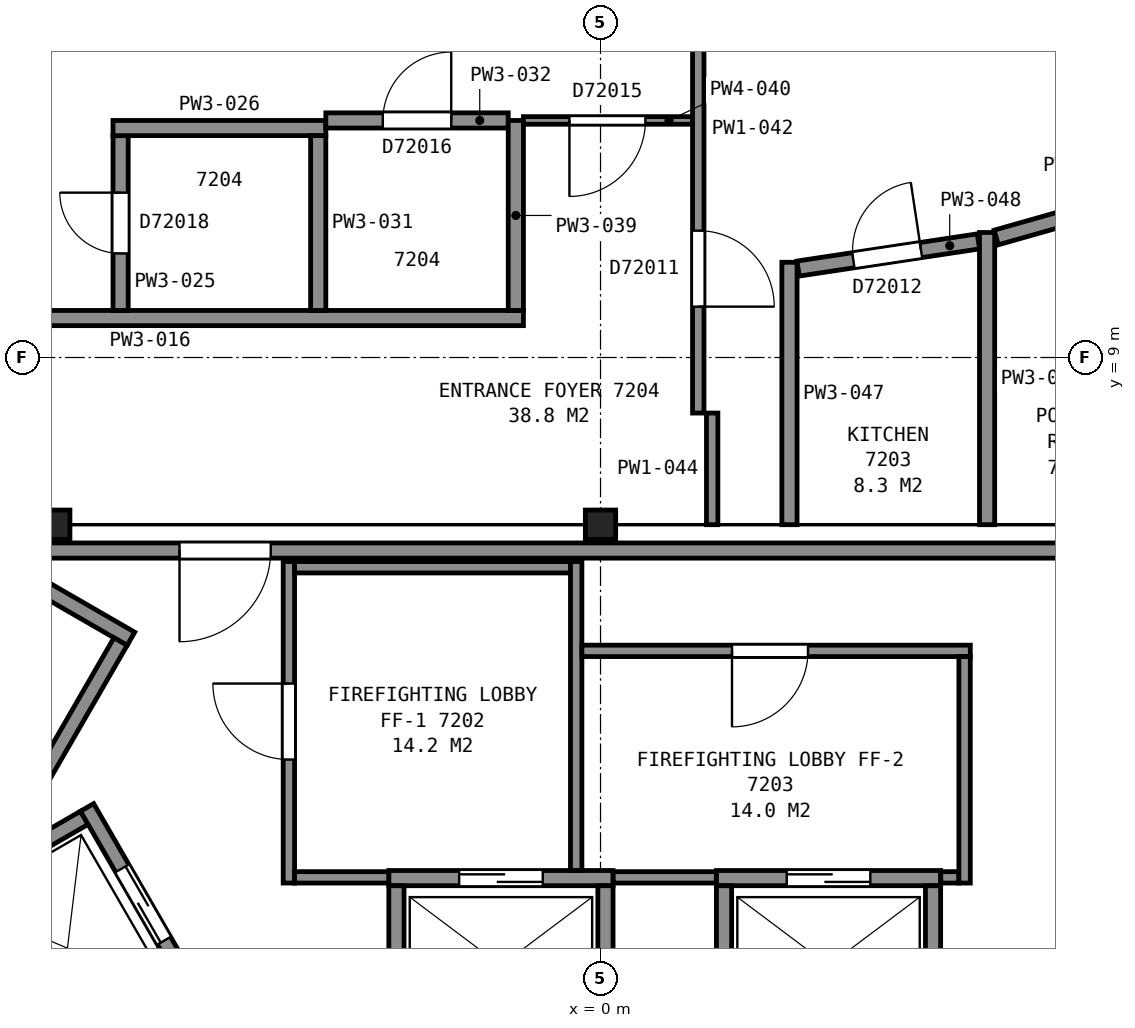
"""IFC4 building model, lengths in metres.
Left out: names, types, materials, properties, quantities, classifications, styles, units other than length and angle.
Written with IfcOpenShell. Run it as: python <this file> out.ifc"""

import sys

from ifc_helpers import new_model, si_unit, direction, frame, frame_2d, origin, origin_2d, place, context, subcontext, project, spatial, rectangle, i_section, extrude, element, fill, save


model = new_model("IFC4")
c1 = context("Model", 3, precision=1e-05, world=origin(), true_north=direction((0.0, 1.0)))
c2 = subcontext(c1, "Body", "Model", "MODEL_VIEW")
j1 = project(units=[si_unit("LENGTHUNIT", "METRE"), si_unit("PLANEANGLEUNIT", "RADIAN")], contexts=[c1])
p1 = place(None, origin())
s1 = spatial("IfcSite", under=j1, at=p1, CompositionType="ELEMENT")
p2 = place(p1, origin())
s2 = spatial("IfcBuilding", under=s1, at=p2, CompositionType="ELEMENT")
p3 = place(p2, frame((0.0, 0.0, 286.2)))
s3 = spatial("IfcBuildingStorey", under=s2, at=p3, CompositionType="ELEMENT", Elevation=286.2)
for number, where, z_axis, x_axis in (
    (1, (0.0, 6.8, 0.0), (0.0, 0.0, 1.0), (1.0, 0.0, 0.0)),
    (2, (-7.18, 6.8, 0.0), (0.0, 0.0, 1.0), (1.0, 0.0, 0.0)),
):
    element("IfcColumn", number, at=place(p3, frame(where, z_axis=z_axis, x_axis=x_axis)), inside=s3, PredefinedType="COLUMN", context=c2, shape_type="SweptSolid", body=[
        extrude(i_section(OverallWidth=0.399, OverallDepth=0.386, WebThickness=0.021, FlangeThickness=0.033, FilletRadius=0.015, at=origin_2d()), origin(), (0.0, 0.0, 1.0), 3.7),
    ])
p4 = place(p3, frame((-6.178, 5.299, 0.0), z_axis=(0.0, 0.0, 1.0), x_axis=(-0.866033125095, 0.499986626058, 0.0)))
e3 = element("IfcWall", 3, at=p4, inside=s3, PredefinedType="PARTITIONING", context=c2, shape_type="SweptSolid", body=[
    extrude(rectangle(XDim=7.2, YDim=0.2, at=frame_2d((3.6, 0.0))), origin(), (0.0, 0.0, 1.0), 3.45),
])
p5 = place(p3, frame((-6.315, 5.262, 0.0), z_axis=(0.0, 0.0, 1.0), x_axis=(-0.500049511043, -0.865996816683, 0.0)))
e4 = element("IfcWall", 4, at=p5, inside=s3, PredefinedType="PARTITIONING", context=c2, shape_type="SweptSolid", body=[
    extrude(rectangle(XDim=2.8, YDim=0.2, at=frame_2d((1.4, 0.0))), origin(), (0.0, 0.0, 1.0), 3.45),
])
p6 = place(p3, frame((-2.785, 2.15, 0.0), z_axis=(0.0, 0.0, 1.0), x_axis=(1.0, 0.0, 0.0)))
e5 = element("IfcWall", 5, at=p6, inside=s3, PredefinedType="PARTITIONING", context=c2, shape_type="SweptSolid", body=[
    extrude(rectangle(XDim=2.95, YDim=0.2, at=frame_2d((1.475, 0.0))), origin(), (0.0, 0.0, 1.0), 3.7),
])
p7 = place(p6, frame((0.925, 0.0, 0.0)))
e6 = element("IfcOpeningElement", 6, at=p7, cuts=e5, PredefinedType="OPENING", context=c2, shape_type="SweptSolid", body=[
    extrude(rectangle(XDim=1.1, YDim=2.1, at=frame_2d((0.55, 1.05))), frame((0.0, 0.11, 0.0), z_axis=(0.0, -1.0, 0.0), x_axis=(1.0, 0.0, 0.0)), (0.0, 0.0, 1.0), 0.22),
])
p8 = place(p3, frame((1.525, 2.15, 0.0), z_axis=(0.0, 0.0, 1.0), x_axis=(1.0, 0.0, 0.0)))
e7 = element("IfcWall", 7, at=p8, inside=s3, PredefinedType="PARTITIONING", context=c2, shape_type="SweptSolid", body=[
    extrude(rectangle(XDim=2.95, YDim=0.2, at=frame_2d((1.475, 0.0))), origin(), (0.0, 0.0, 1.0), 3.7),
])
p9 = place(p8, frame((0.925, 0.0, 0.0)))
e8 = element("IfcOpeningElement", 8, at=p9, cuts=e7, PredefinedType="OPENING", context=c2, shape_type="SweptSolid", body=[
    extrude(rectangle(XDim=1.1, YDim=2.1, at=frame_2d((0.55, 1.05))), frame((0.0, 0.11, 0.0), z_axis=(0.0, -1.0, 0.0), x_axis=(1.0, 0.0, 0.0)), (0.0, 0.0, 1.0), 0.22),
])
for number, where, z_axis, x_axis in (
    (9, (-8.48, 1.969, 0.0), (0.0, 0.0, 1.0), (0.866, 0.5, 0.0)),
    (10, (4.375, 0.1, 0.0), (0.0, 0.0, 1.0), (0.0, 1.0, 0.0)),
    (11, (1.625, 0.1, 0.0), (0.0, 0.0, 1.0), (0.0, 1.0, 0.0)),
    (12, (0.065, 0.1, 0.0), (0.0, 0.0, 1.0), (0.0, 1.0, 0.0)),
    (13, (-2.685, 0.1, 0.0), (0.0, 0.0, 1.0), (0.0, 1.0, 0.0)),
):
    element("IfcWall", number, at=place(p3, frame(where, z_axis=z_axis, x_axis=x_axis)), inside=s3, PredefinedType="PARTITIONING", context=c2, shape_type="SweptSolid", body=[
        extrude(rectangle(XDim=1.95, YDim=0.2, at=frame_2d((0.975, 0.0))), origin(), (0.0, 0.0, 1.0), 3.7),
    ])
p10 = place(p3, frame((-5.28, 0.525, 0.0), z_axis=(0.0, 0.0, 1.0), x_axis=(-0.500037662692, 0.866003658127, 0.0)))
e14 = element("IfcWall", 14, at=p10, inside=s3, PredefinedType="PARTITIONING", context=c2, shape_type="SweptSolid", body=[
    extrude(rectangle(XDim=2.95, YDim=0.2, at=frame_2d((1.475, 0.0))), origin(), (0.0, 0.0, 1.0), 3.7),
])
p11 = place(p10, frame((0.925, 0.0, 0.0)))
e15 = element("IfcOpeningElement", 15, at=p11, cuts=e14, PredefinedType="OPENING", context=c2, shape_type="SweptSolid", body=[
    extrude(rectangle(XDim=1.1, YDim=2.1, at=frame_2d((0.55, 1.05))), frame((0.0, 0.11, 0.0), z_axis=(0.0, -1.0, 0.0), x_axis=(1.0, 0.0, 0.0)), (0.0, 0.0, 1.0), 0.22),
])
p12 = place(p3, frame((-7.142, -0.55, 0.0), z_axis=(0.0, 0.0, 1.0), x_axis=(-0.49997559174, 0.866039495442, 0.0)))
e16 = element("IfcWall", 16, at=p12, inside=s3, PredefinedType="PARTITIONING", context=c2, shape_type="SweptSolid", body=[
    extrude(rectangle(XDim=2.95, YDim=0.2, at=frame_2d((1.475, 0.0))), origin(), (0.0, 0.0, 1.0), 3.7),
])
p13 = place(p3, frame((7.829, 6.46, 0.0), z_axis=(0.0, 0.0, 1.0), x_axis=(-1.0, 0.0, 0.0)))
e17 = element("IfcWall", 17, at=p13, inside=s3, PredefinedType="PARTITIONING", context=c2, shape_type="SweptSolid", body=[
    extrude(rectangle(XDim=15.658, YDim=0.2, at=frame_2d((7.829, 0.0))), origin(), (0.0, 0.0, 1.0), 3.45),
])
p14 = place(p13, frame((12.168, 0.0, 0.0)))
e18 = element("IfcOpeningElement", 18, at=p14, cuts=e17, PredefinedType="OPENING", context=c2, shape_type="SweptSolid", body=[
    extrude(rectangle(XDim=1.2, YDim=2.1, at=frame_2d((0.6, 1.05))), frame((0.0, 0.11, 0.0), z_axis=(0.0, -1.0, 0.0), x_axis=(1.0, 0.0, 0.0)), (0.0, 0.0, 1.0), 0.22),
])
p15 = place(p3, frame((-4.1, 2.085, 0.0), z_axis=(0.0, 0.0, 1.0), x_axis=(0.0, 1.0, 0.0)))
e19 = element("IfcWall", 19, at=p15, inside=s3, PredefinedType="PARTITIONING", context=c2, shape_type="SweptSolid", body=[
    extrude(rectangle(XDim=4.23, YDim=0.15, at=frame_2d((2.115, 0.0))), origin(), (0.0, 0.0, 1.0), 3.45),
])
p16 = place(p15, frame((1.625, 0.0, 0.0)))
e20 = element("IfcOpeningElement", 20, at=p16, cuts=e19, PredefinedType="OPENING", context=c2, shape_type="SweptSolid", body=[
    extrude(rectangle(XDim=1.0, YDim=2.1, at=frame_2d((0.5, 1.05))), frame((0.0, 0.085, 0.0), z_axis=(0.0, -1.0, 0.0), x_axis=(1.0, 0.0, 0.0)), (0.0, 0.0, 1.0), 0.17),
])
p17 = place(p3, frame((-4.025, 2.16, 0.0), z_axis=(0.0, 0.0, 1.0), x_axis=(1.0, 0.0, 0.0)))
e21 = element("IfcWall", 21, at=p17, inside=s3, PredefinedType="PARTITIONING", context=c2, shape_type="SweptSolid", body=[
    extrude(rectangle(XDim=1.238, YDim=0.15, at=frame_2d((0.619, 0.0))), origin(), (0.0, 0.0, 1.0), 3.45),
])
p18 = place(p3, frame((-4.025, 6.24, 0.0), z_axis=(0.0, 0.0, 1.0), x_axis=(1.0, 0.0, 0.0)))
e22 = element("IfcWall", 22, at=p18, inside=s3, PredefinedType="PARTITIONING", context=c2, shape_type="SweptSolid", body=[
    extrude(rectangle(XDim=3.63, YDim=0.15, at=frame_2d((1.815, 0.0))), origin(), (0.0, 0.0, 1.0), 3.45),
])
p19 = place(p3, frame((-0.32, 2.252, 0.0), z_axis=(0.0, 0.0, 1.0), x_axis=(0.0, 1.0, 0.0)))
e23 = element("IfcWall", 23, at=p19, inside=s3, PredefinedType="PARTITIONING", context=c2, shape_type="SweptSolid", body=[
    extrude(rectangle(XDim=4.063, YDim=0.15, at=frame_2d((2.031, 0.0))), origin(), (0.0, 0.0, 1.0), 3.45),
])
p20 = place(p3, frame((-0.245, 5.14, 0.0), z_axis=(0.0, 0.0, 1.0), x_axis=(1.0, 0.0, 0.0)))
e24 = element("IfcWall", 24, at=p20, inside=s3, PredefinedType="PARTITIONING", context=c2, shape_type="SweptSolid", body=[
    extrude(rectangle(XDim=5.11, YDim=0.15, at=frame_2d((2.555, 0.0))), origin(), (0.0, 0.0, 1.0), 3.45),
])
p21 = place(p20, frame((1.975, 0.0, 0.0)))
e25 = element("IfcOpeningElement", 25, at=p21, cuts=e24, PredefinedType="OPENING", context=c2, shape_type="SweptSolid", body=[
    extrude(rectangle(XDim=1.0, YDim=2.1, at=frame_2d((0.5, 1.05))), frame((0.0, 0.085, 0.0), z_axis=(0.0, -1.0, 0.0), x_axis=(1.0, 0.0, 0.0)), (0.0, 0.0, 1.0), 0.17),
])
p22 = place(p3, frame((0.167, 2.16, 0.0), z_axis=(0.0, 0.0, 1.0), x_axis=(1.0, 0.0, 0.0)))
e26 = element("IfcWall", 26, at=p22, inside=s3, PredefinedType="PARTITIONING", context=c2, shape_type="SweptSolid", body=[
    extrude(rectangle(XDim=1.356, YDim=0.15, at=frame_2d((0.678, 0.0))), origin(), (0.0, 0.0, 1.0), 3.45),
])
p23 = place(p3, frame((3.828, -6.29, 0.0), z_axis=(0.0, 0.0, 1.0), x_axis=(0.499979739078, 0.866037101117, 0.0)))
e27 = element("IfcWall", 27, at=p23, inside=s3, PredefinedType="PARTITIONING", context=c2, shape_type="SweptSolid", body=[
    extrude(rectangle(XDim=11.363, YDim=0.2, at=frame_2d((5.681, 0.0))), origin(), (0.0, 0.0, 1.0), 3.45),
])
p24 = place(p23, frame((0.55, 0.0, 0.0)))
e28 = element("IfcOpeningElement", 28, at=p24, cuts=e27, PredefinedType="OPENING", context=c2, shape_type="SweptSolid", body=[
    extrude(rectangle(XDim=1.2, YDim=2.1, at=frame_2d((0.6, 1.05))), frame((0.0, 0.11, 0.0), z_axis=(0.0, -1.0, 0.0), x_axis=(1.0, 0.0, 0.0)), (0.0, 0.0, 1.0), 0.22),
])
p25 = place(p3, frame((4.477, 2.16, 0.0), z_axis=(0.0, 0.0, 1.0), x_axis=(1.0, 0.0, 0.0)))
e29 = element("IfcWall", 29, at=p25, inside=s3, PredefinedType="PARTITIONING", context=c2, shape_type="SweptSolid", body=[
    extrude(rectangle(XDim=0.238, YDim=0.15, at=frame_2d((0.119, 0.0))), origin(), (0.0, 0.0, 1.0), 3.45),
])
p26 = place(p3, frame((4.79, 2.085, 0.0), z_axis=(0.0, 0.0, 1.0), x_axis=(0.0, 1.0, 0.0)))
e30 = element("IfcWall", 30, at=p26, inside=s3, PredefinedType="PARTITIONING", context=c2, shape_type="SweptSolid", body=[
    extrude(rectangle(XDim=2.98, YDim=0.15, at=frame_2d((1.49, 0.0))), origin(), (0.0, 0.0, 1.0), 3.45),
])
p27 = place(p3, frame((-10.838, 9.519, 0.0), z_axis=(0.0, 0.0, 1.0), x_axis=(1.0, 0.0, 0.0)))
e31 = element("IfcWall", 31, at=p27, inside=s3, PredefinedType="PARTITIONING", context=c2, shape_type="SweptSolid", body=[
    extrude(rectangle(XDim=9.824, YDim=0.2, at=frame_2d((4.912, 0.0))), origin(), (0.0, 0.0, 1.0), 2.723),
])
p28 = place(p3, frame((-6.314, 11.919, 0.0), z_axis=(0.0, 0.0, 1.0), x_axis=(0.0, -1.0, 0.0)))
e32 = element("IfcWall", 32, at=p28, inside=s3, PredefinedType="PARTITIONING", context=c2, shape_type="SweptSolid", body=[
    extrude(rectangle(XDim=2.3, YDim=0.2, at=frame_2d((1.15, 0.0))), origin(), (0.0, 0.0, 1.0), 2.723),
])
p29 = place(p28, frame((0.75, 0.0, 0.0)))
e33 = element("IfcOpeningElement", 33, at=p29, cuts=e32, PredefinedType="OPENING", context=c2, shape_type="SweptSolid", body=[
    extrude(rectangle(XDim=0.8, YDim=2.1, at=frame_2d((0.4, 1.05))), frame((0.0, 0.11, 0.0), z_axis=(0.0, -1.0, 0.0), x_axis=(1.0, 0.0, 0.0)), (0.0, 0.0, 1.0), 0.22),
])
p30 = place(p3, frame((-6.414, 12.019, 0.0), z_axis=(0.0, 0.0, 1.0), x_axis=(1.0, 0.0, 0.0)))
e34 = element("IfcWall", 34, at=p30, inside=s3, PredefinedType="PARTITIONING", context=c2, shape_type="SweptSolid", body=[
    extrude(rectangle(XDim=2.8, YDim=0.2, at=frame_2d((1.4, 0.0))), origin(), (0.0, 0.0, 1.0), 2.723),
])
p31 = place(p3, frame((-3.714, 9.619, 0.0), z_axis=(0.0, 0.0, 1.0), x_axis=(0.0, 1.0, 0.0)))
e35 = element("IfcWall", 35, at=p31, inside=s3, PredefinedType="PARTITIONING", context=c2, shape_type="SweptSolid", body=[
    extrude(rectangle(XDim=2.3, YDim=0.2, at=frame_2d((1.15, 0.0))), origin(), (0.0, 0.0, 1.0), 2.723),
])
p32 = place(p3, frame((-1.214, 12.119, 0.0), z_axis=(0.0, 0.0, 1.0), x_axis=(-1.0, 0.0, 0.0)))
e36 = element("IfcWall", 36, at=p32, inside=s3, PredefinedType="PARTITIONING", context=c2, shape_type="SweptSolid", body=[
    extrude(rectangle(XDim=2.4, YDim=0.2, at=frame_2d((1.2, 0.0))), origin(), (0.0, 0.0, 1.0), 2.723),
])
p33 = place(p32, frame((0.75, 0.0, 0.0)))
e37 = element("IfcOpeningElement", 37, at=p33, cuts=e36, PredefinedType="OPENING", context=c2, shape_type="SweptSolid", body=[
    extrude(rectangle(XDim=0.9, YDim=2.1, at=frame_2d((0.45, 1.05))), frame((0.0, 0.11, 0.0), z_axis=(0.0, -1.0, 0.0), x_axis=(1.0, 0.0, 0.0)), (0.0, 0.0, 1.0), 0.22),
])
p34 = place(p3, frame((-1.114, 9.619, 0.0), z_axis=(0.0, 0.0, 1.0), x_axis=(0.0, 1.0, 0.0)))
e38 = element("IfcWall", 38, at=p34, inside=s3, PredefinedType="PARTITIONING", context=c2, shape_type="SweptSolid", body=[
    extrude(rectangle(XDim=2.5, YDim=0.2, at=frame_2d((1.25, 0.0))), origin(), (0.0, 0.0, 1.0), 2.723),
])
p35 = place(p3, frame((-1.014, 12.119, 0.0), z_axis=(0.0, 0.0, 1.0), x_axis=(1.0, 0.0, 0.0)))
e39 = element("IfcWall", 39, at=p35, inside=s3, PredefinedType="PARTITIONING", context=c2, shape_type="SweptSolid", body=[
    extrude(rectangle(XDim=2.225, YDim=0.1, at=frame_2d((1.112, 0.0))), origin(), (0.0, 0.0, 1.0), 2.723),
])
p36 = place(p35, frame((0.605, 0.0, 0.0)))
e40 = element("IfcOpeningElement", 40, at=p36, cuts=e39, PredefinedType="OPENING", context=c2, shape_type="SweptSolid", body=[
    extrude(rectangle(XDim=1.0, YDim=2.1, at=frame_2d((0.5, 1.05))), frame((0.0, 0.06, 0.0), z_axis=(0.0, -1.0, 0.0), x_axis=(1.0, 0.0, 0.0)), (0.0, 0.0, 1.0), 0.12),
])
p37 = place(p3, frame((1.286, 13.351, 0.0), z_axis=(0.0, 0.0, 1.0), x_axis=(0.0, -1.0, 0.0)))
e41 = element("IfcWall", 41, at=p37, inside=s3, PredefinedType="PARTITIONING", context=c2, shape_type="SweptSolid", body=[
    extrude(rectangle(XDim=5.082, YDim=0.15, at=frame_2d((2.541, 0.0))), origin(), (0.0, 0.0, 1.0), 2.723),
])
p38 = place(p37, frame((2.682, 0.0, 0.0)))
e42 = element("IfcOpeningElement", 42, at=p38, cuts=e41, PredefinedType="OPENING", context=c2, shape_type="SweptSolid", body=[
    extrude(rectangle(XDim=1.0, YDim=2.1, at=frame_2d((0.5, 1.05))), frame((0.0, 0.085, 0.0), z_axis=(0.0, -1.0, 0.0), x_axis=(1.0, 0.0, 0.0)), (0.0, 0.0, 1.0), 0.17),
])
p39 = place(p3, frame((1.469, 6.8, 0.0), z_axis=(0.0, 0.0, 1.0), x_axis=(0.0, 1.0, 0.0)))
e43 = element("IfcWall", 43, at=p39, inside=s3, PredefinedType="PARTITIONING", context=c2, shape_type="SweptSolid", body=[
    extrude(rectangle(XDim=1.469, YDim=0.15, at=frame_2d((0.734, 0.0))), origin(), (0.0, 0.0, 1.0), 2.723),
])
p40 = place(p3, frame((2.486, 6.8, 0.0), z_axis=(0.0, 0.0, 1.0), x_axis=(0.0, 1.0, 0.0)))
e44 = element("IfcWall", 44, at=p40, inside=s3, PredefinedType="PARTITIONING", context=c2, shape_type="SweptSolid", body=[
    extrude(rectangle(XDim=3.453, YDim=0.2, at=frame_2d((1.727, 0.0))), origin(), (0.0, 0.0, 1.0), 2.723),
])
p41 = place(p3, frame((4.972, 10.528, 0.0), z_axis=(0.0, 0.0, 1.0), x_axis=(-0.988827119235, -0.149066858374, 0.0)))
e45 = element("IfcWall", 45, at=p41, inside=s3, PredefinedType="PARTITIONING", context=c2, shape_type="SweptSolid", body=[
    extrude(rectangle(XDim=2.399, YDim=0.2, at=frame_2d((1.2, 0.0))), origin(), (0.0, 0.0, 1.0), 2.723),
])
p42 = place(p41, frame((0.764, 0.0, 0.0)))
e46 = element("IfcOpeningElement", 46, at=p42, cuts=e45, PredefinedType="OPENING", context=c2, shape_type="SweptSolid", body=[
    extrude(rectangle(XDim=0.9, YDim=2.1, at=frame_2d((0.45, 1.05))), frame((0.0, 0.11, 0.0), z_axis=(0.0, -1.0, 0.0), x_axis=(1.0, 0.0, 0.0)), (0.0, 0.0, 1.0), 0.22),
])
p43 = place(p3, frame((5.086, 6.8, 0.0), z_axis=(0.0, 0.0, 1.0), x_axis=(0.0, 1.0, 0.0)))
e47 = element("IfcWall", 47, at=p43, inside=s3, PredefinedType="PARTITIONING", context=c2, shape_type="SweptSolid", body=[
    extrude(rectangle(XDim=3.845, YDim=0.2, at=frame_2d((1.922, 0.0))), origin(), (0.0, 0.0, 1.0), 2.723),
])
p44 = place(p3, frame((5.206, 10.579, 0.0), z_axis=(0.0, 0.0, 1.0), x_axis=(0.962043687615, 0.272895480212, 0.0)))
e48 = element("IfcWall", 48, at=p44, inside=s3, PredefinedType="PARTITIONING", context=c2, shape_type="SweptSolid", body=[
    extrude(rectangle(XDim=2.032, YDim=0.2, at=frame_2d((1.016, 0.0))), origin(), (0.0, 0.0, 1.0), 2.723),
])
p45 = place(p7, origin())
e49 = element("IfcDoor", 49, at=p45, inside=s3, OperationType="SLIDING_TO_LEFT", PredefinedType="DOOR", context=c2, shape_type="SweptSolid", body=[
    extrude(rectangle(XDim=1.1, YDim=2.1, at=frame_2d((0.55, 1.05))), frame((0.0, 0.025, 0.0), z_axis=(0.0, -1.0, 0.0), x_axis=(1.0, 0.0, 0.0)), (0.0, 0.0, 1.0), 0.05),
])
fill(e6, e49)
p46 = place(p9, origin())
e50 = element("IfcDoor", 50, at=p46, inside=s3, OperationType="SLIDING_TO_RIGHT", PredefinedType="DOOR", context=c2, shape_type="SweptSolid", body=[
    extrude(rectangle(XDim=1.1, YDim=2.1, at=frame_2d((0.55, 1.05))), frame((0.0, 0.025, 0.0), z_axis=(0.0, -1.0, 0.0), x_axis=(1.0, 0.0, 0.0)), (0.0, 0.0, 1.0), 0.05),
])
fill(e8, e50)
p47 = place(p11, origin())
e51 = element("IfcDoor", 51, at=p47, inside=s3, OperationType="SLIDING_TO_LEFT", PredefinedType="DOOR", context=c2, shape_type="SweptSolid", body=[
    extrude(rectangle(XDim=1.1, YDim=2.1, at=frame_2d((0.55, 1.05))), frame((0.0, 0.025, 0.0), z_axis=(0.0, -1.0, 0.0), x_axis=(1.0, 0.0, 0.0)), (0.0, 0.0, 1.0), 0.05),
])
fill(e15, e51)
p48 = place(p14, origin())
e52 = element("IfcDoor", 52, at=p48, inside=s3, OperationType="SINGLE_SWING_RIGHT", PredefinedType="DOOR", context=c2, shape_type="SweptSolid", body=[
    extrude(rectangle(XDim=1.2, YDim=2.1, at=frame_2d((0.6, 1.05))), frame((0.0, 0.025, 0.0), z_axis=(0.0, -1.0, 0.0), x_axis=(1.0, 0.0, 0.0)), (0.0, 0.0, 1.0), 0.05),
])
fill(e18, e52)
p49 = place(p16, origin())
e53 = element("IfcDoor", 53, at=p49, inside=s3, OperationType="SINGLE_SWING_RIGHT", PredefinedType="DOOR", context=c2, shape_type="SweptSolid", body=[
    extrude(rectangle(XDim=1.0, YDim=2.1, at=frame_2d((0.5, 1.05))), frame((0.0, 0.025, 0.0), z_axis=(0.0, -1.0, 0.0), x_axis=(1.0, 0.0, 0.0)), (0.0, 0.0, 1.0), 0.05),
])
fill(e20, e53)
p50 = place(p21, origin())
e54 = element("IfcDoor", 54, at=p50, inside=s3, OperationType="SINGLE_SWING_LEFT", PredefinedType="DOOR", context=c2, shape_type="SweptSolid", body=[
    extrude(rectangle(XDim=1.0, YDim=2.1, at=frame_2d((0.5, 1.05))), frame((0.0, 0.025, 0.0), z_axis=(0.0, -1.0, 0.0), x_axis=(1.0, 0.0, 0.0)), (0.0, 0.0, 1.0), 0.05),
])
fill(e25, e54)
p51 = place(p29, origin())
e55 = element("IfcDoor", 55, at=p51, inside=s3, OperationType="SINGLE_SWING_LEFT", PredefinedType="DOOR", context=c2, shape_type="SweptSolid", body=[
    extrude(rectangle(XDim=0.8, YDim=2.1, at=frame_2d((0.4, 1.05))), frame((0.0, 0.025, 0.0), z_axis=(0.0, -1.0, 0.0), x_axis=(1.0, 0.0, 0.0)), (0.0, 0.0, 1.0), 0.05),
])
fill(e33, e55)
p52 = place(p33, origin())
e56 = element("IfcDoor", 56, at=p52, inside=s3, OperationType="SINGLE_SWING_LEFT", PredefinedType="DOOR", context=c2, shape_type="SweptSolid", body=[
    extrude(rectangle(XDim=0.9, YDim=2.1, at=frame_2d((0.45, 1.05))), frame((0.0, 0.025, 0.0), z_axis=(0.0, -1.0, 0.0), x_axis=(1.0, 0.0, 0.0)), (0.0, 0.0, 1.0), 0.05),
])
fill(e37, e56)
p53 = place(p36, origin())
e57 = element("IfcDoor", 57, at=p53, inside=s3, OperationType="SINGLE_SWING_LEFT", PredefinedType="DOOR", context=c2, shape_type="SweptSolid", body=[
    extrude(rectangle(XDim=1.0, YDim=2.1, at=frame_2d((0.5, 1.05))), frame((0.0, 0.025, 0.0), z_axis=(0.0, -1.0, 0.0), x_axis=(1.0, 0.0, 0.0)), (0.0, 0.0, 1.0), 0.05),
])
fill(e40, e57)
p54 = place(p38, origin())
e58 = element("IfcDoor", 58, at=p54, inside=s3, OperationType="SINGLE_SWING_RIGHT", PredefinedType="DOOR", context=c2, shape_type="SweptSolid", body=[
    extrude(rectangle(XDim=1.0, YDim=2.1, at=frame_2d((0.5, 1.05))), frame((0.0, 0.025, 0.0), z_axis=(0.0, -1.0, 0.0), x_axis=(1.0, 0.0, 0.0)), (0.0, 0.0, 1.0), 0.05),
])
fill(e42, e58)
p55 = place(p42, origin())
e59 = element("IfcDoor", 59, at=p55, inside=s3, OperationType="SINGLE_SWING_LEFT", PredefinedType="DOOR", context=c2, shape_type="SweptSolid", body=[
    extrude(rectangle(XDim=0.9, YDim=2.1, at=frame_2d((0.45, 1.05))), frame((0.0, 0.025, 0.0), z_axis=(0.0, -1.0, 0.0), x_axis=(1.0, 0.0, 0.0)), (0.0, 0.0, 1.0), 0.05),
])
fill(e46, e59)
save(model, sys.argv[1])
